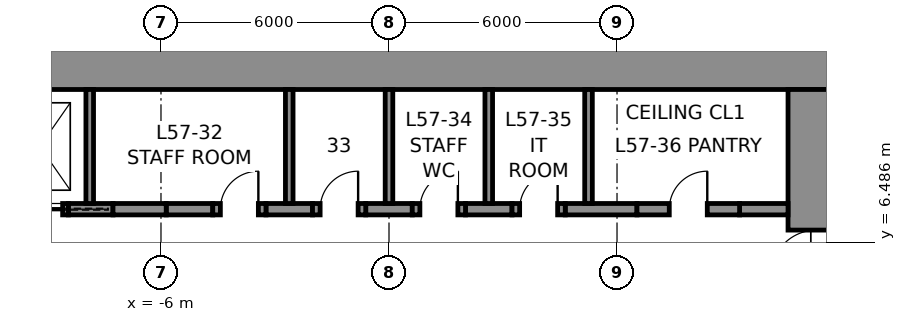
"""IFC4 building model, lengths in metres.
Left out: names, types, materials, properties, quantities, classifications, styles, units other than length and angle.
Written with IfcOpenShell. Run it as: python <this file> out.ifc"""

import sys

from ifc_helpers import new_model, si_unit, direction, frame, frame_2d, origin, place, context, subcontext, project, spatial, rectangle, extrude, element, fill, save


model = new_model("IFC4")
c1 = context("Model", 3, precision=1e-05, world=origin(), true_north=direction((0.0, 1.0)))
c2 = subcontext(c1, "Body", "Model", "MODEL_VIEW")
j1 = project(units=[si_unit("LENGTHUNIT", "METRE"), si_unit("PLANEANGLEUNIT", "RADIAN")], contexts=[c1])
p1 = place(None, origin())
s1 = spatial("IfcSite", under=j1, at=p1, CompositionType="ELEMENT")
p2 = place(p1, origin())
s2 = spatial("IfcBuilding", under=s1, at=p2, CompositionType="ELEMENT")
p3 = place(p2, frame((0.0, 0.0, 257.8)))
s3 = spatial("IfcBuildingStorey", under=s2, at=p3, CompositionType="ELEMENT", Elevation=257.8)
p4 = place(p3, frame((-12.0, 11.25, 0.0), z_axis=(0.0, 0.0, 1.0), x_axis=(1.0, 0.0, 0.0)))
e1 = element("IfcWall", 1, at=p4, inside=s3, PredefinedType="SHEAR", context=c2, shape_type="SweptSolid", body=[
    extrude(rectangle(XDim=24.0, YDim=1.5, at=frame_2d((12.0, 0.0))), origin(), (0.0, 0.0, 1.0), 4.0),
])
p5 = place(p3, frame((11.25, 10.5, 0.0), z_axis=(0.0, 0.0, 1.0), x_axis=(0.0, -1.0, 0.0)))
e2 = element("IfcWall", 2, at=p5, inside=s3, PredefinedType="SHEAR", context=c2, shape_type="SweptSolid", body=[
    extrude(rectangle(XDim=21.0, YDim=1.5, at=frame_2d((10.5, 0.0))), origin(), (0.0, 0.0, 1.0), 4.0),
])
p6 = place(p5, frame((3.7, 0.0, 0.0)))
e3 = element("IfcOpeningElement", 3, at=p6, cuts=e2, PredefinedType="OPENING", context=c2, shape_type="SweptSolid", body=[
    extrude(rectangle(XDim=1.2, YDim=2.3, at=frame_2d((0.6, 1.15))), frame((0.0, 0.76, 0.0), z_axis=(0.0, -1.0, 0.0), x_axis=(1.0, 0.0, 0.0)), (0.0, 0.0, 1.0), 1.52),
])
p7 = place(p5, frame((16.1, 0.0, 0.0)))
e4 = element("IfcOpeningElement", 4, at=p7, cuts=e2, PredefinedType="OPENING", context=c2, shape_type="SweptSolid", body=[
    extrude(rectangle(XDim=1.2, YDim=2.3, at=frame_2d((0.6, 1.15))), frame((0.0, 0.76, 0.0), z_axis=(0.0, -1.0, 0.0), x_axis=(1.0, 0.0, 0.0)), (0.0, 0.0, 1.0), 1.52),
])
p8 = place(p3, frame((-8.438, 7.35, 0.0), z_axis=(0.0, 0.0, 1.0), x_axis=(1.0, 0.0, 0.0)))
e5 = element("IfcWall", 5, at=p8, inside=s3, PredefinedType="SHEAR", context=c2, shape_type="SweptSolid", body=[
    extrude(rectangle(XDim=1.175, YDim=0.3, at=frame_2d((0.587, 0.0))), origin(), (0.0, 0.0, 1.0), 4.0),
])
for number, where, z_axis, x_axis in (
    (6, (-5.863, 7.35, 0.0), (0.0, 0.0, 1.0), (1.0, 0.0, 0.0)),
    (7, (-3.238, 7.35, 0.0), (0.0, 0.0, 1.0), (1.0, 0.0, 0.0)),
    (8, (-0.613, 7.35, 0.0), (0.0, 0.0, 1.0), (1.0, 0.0, 0.0)),
    (9, (2.012, 7.35, 0.0), (0.0, 0.0, 1.0), (1.0, 0.0, 0.0)),
):
    element("IfcWall", number, at=place(p3, frame(where, z_axis=z_axis, x_axis=x_axis)), inside=s3, PredefinedType="SHEAR", context=c2, shape_type="SweptSolid", body=[
        extrude(rectangle(XDim=1.225, YDim=0.3, at=frame_2d((0.613, 0.0))), origin(), (0.0, 0.0, 1.0), 4.0),
    ])
p9 = place(p3, frame((4.637, 7.35, 0.0), z_axis=(0.0, 0.0, 1.0), x_axis=(1.0, 0.0, 0.0)))
e10 = element("IfcWall", 10, at=p9, inside=s3, PredefinedType="SHEAR", context=c2, shape_type="SweptSolid", body=[
    extrude(rectangle(XDim=1.887, YDim=0.3, at=frame_2d((0.944, 0.0))), origin(), (0.0, 0.0, 1.0), 4.0),
])
p10 = place(p3, frame((9.225, 7.35, 0.0), z_axis=(0.0, 0.0, 1.0), x_axis=(1.0, 0.0, 0.0)))
e11 = element("IfcWall", 11, at=p10, inside=s3, PredefinedType="SHEAR", context=c2, shape_type="SweptSolid", body=[
    extrude(rectangle(XDim=1.275, YDim=0.3, at=frame_2d((0.637, 0.0))), origin(), (0.0, 0.0, 1.0), 4.0),
])
p11 = place(p3, frame((-9.938, 7.35, 0.0), z_axis=(0.0, 0.0, 1.0), x_axis=(1.0, 0.0, 0.0)))
e12 = element("IfcWall", 12, at=p11, inside=s3, PredefinedType="PARTITIONING", context=c2, shape_type="SweptSolid", body=[
    extrude(rectangle(XDim=1.5, YDim=0.3, at=frame_2d((0.75, 0.0))), origin(), (0.0, 0.0, 1.0), 4.0),
])
p12 = place(p11, frame((0.15, 0.0, 0.0)))
e13 = element("IfcOpeningElement", 13, at=p12, cuts=e12, PredefinedType="OPENING", context=c2, shape_type="SweptSolid", body=[
    extrude(rectangle(XDim=1.2, YDim=2.3, at=frame_2d((0.6, 1.15))), frame((0.0, 0.16, 0.0), z_axis=(0.0, -1.0, 0.0), x_axis=(1.0, 0.0, 0.0)), (0.0, 0.0, 1.0), 0.32),
])
p13 = place(p3, frame((-7.262, 7.35, 0.0), z_axis=(0.0, 0.0, 1.0), x_axis=(1.0, 0.0, 0.0)))
e14 = element("IfcWall", 14, at=p13, inside=s3, PredefinedType="PARTITIONING", context=c2, shape_type="SweptSolid", body=[
    extrude(rectangle(XDim=1.4, YDim=0.3, at=frame_2d((0.7, 0.0))), origin(), (0.0, 0.0, 1.0), 4.0),
])
p14 = place(p3, frame((-4.637, 7.35, 0.0), z_axis=(0.0, 0.0, 1.0), x_axis=(1.0, 0.0, 0.0)))
e15 = element("IfcWall", 15, at=p14, inside=s3, PredefinedType="PARTITIONING", context=c2, shape_type="SweptSolid", body=[
    extrude(rectangle(XDim=1.4, YDim=0.3, at=frame_2d((0.7, 0.0))), origin(), (0.0, 0.0, 1.0), 4.0),
])
p15 = place(p14, frame((0.2, 0.0, 0.0)))
e16 = element("IfcOpeningElement", 16, at=p15, cuts=e15, PredefinedType="OPENING", context=c2, shape_type="SweptSolid", body=[
    extrude(rectangle(XDim=1.0, YDim=2.3, at=frame_2d((0.5, 1.15))), frame((0.0, 0.16, 0.0), z_axis=(0.0, -1.0, 0.0), x_axis=(1.0, 0.0, 0.0)), (0.0, 0.0, 1.0), 0.32),
])
p16 = place(p3, frame((-2.012, 7.35, 0.0), z_axis=(0.0, 0.0, 1.0), x_axis=(1.0, 0.0, 0.0)))
e17 = element("IfcWall", 17, at=p16, inside=s3, PredefinedType="PARTITIONING", context=c2, shape_type="SweptSolid", body=[
    extrude(rectangle(XDim=1.4, YDim=0.3, at=frame_2d((0.7, 0.0))), origin(), (0.0, 0.0, 1.0), 4.0),
])
p17 = place(p16, frame((0.2, 0.0, 0.0)))
e18 = element("IfcOpeningElement", 18, at=p17, cuts=e17, PredefinedType="OPENING", context=c2, shape_type="SweptSolid", body=[
    extrude(rectangle(XDim=1.0, YDim=2.3, at=frame_2d((0.5, 1.15))), frame((0.0, 0.16, 0.0), z_axis=(0.0, -1.0, 0.0), x_axis=(1.0, 0.0, 0.0)), (0.0, 0.0, 1.0), 0.32),
])
p18 = place(p3, frame((0.613, 7.35, 0.0), z_axis=(0.0, 0.0, 1.0), x_axis=(1.0, 0.0, 0.0)))
e19 = element("IfcWall", 19, at=p18, inside=s3, PredefinedType="PARTITIONING", context=c2, shape_type="SweptSolid", body=[
    extrude(rectangle(XDim=1.4, YDim=0.3, at=frame_2d((0.7, 0.0))), origin(), (0.0, 0.0, 1.0), 4.0),
])
p19 = place(p18, frame((0.2, 0.0, 0.0)))
e20 = element("IfcOpeningElement", 20, at=p19, cuts=e19, PredefinedType="OPENING", context=c2, shape_type="SweptSolid", body=[
    extrude(rectangle(XDim=1.0, YDim=2.3, at=frame_2d((0.5, 1.15))), frame((0.0, 0.16, 0.0), z_axis=(0.0, -1.0, 0.0), x_axis=(1.0, 0.0, 0.0)), (0.0, 0.0, 1.0), 0.32),
])
p20 = place(p3, frame((3.238, 7.35, 0.0), z_axis=(0.0, 0.0, 1.0), x_axis=(1.0, 0.0, 0.0)))
e21 = element("IfcWall", 21, at=p20, inside=s3, PredefinedType="PARTITIONING", context=c2, shape_type="SweptSolid", body=[
    extrude(rectangle(XDim=1.4, YDim=0.3, at=frame_2d((0.7, 0.0))), origin(), (0.0, 0.0, 1.0), 4.0),
])
p21 = place(p20, frame((0.2, 0.0, 0.0)))
e22 = element("IfcOpeningElement", 22, at=p21, cuts=e21, PredefinedType="OPENING", context=c2, shape_type="SweptSolid", body=[
    extrude(rectangle(XDim=1.0, YDim=2.3, at=frame_2d((0.5, 1.15))), frame((0.0, 0.16, 0.0), z_axis=(0.0, -1.0, 0.0), x_axis=(1.0, 0.0, 0.0)), (0.0, 0.0, 1.0), 0.32),
])
p22 = place(p3, frame((6.525, 7.35, 0.0), z_axis=(0.0, 0.0, 1.0), x_axis=(1.0, 0.0, 0.0)))
e23 = element("IfcWall", 23, at=p22, inside=s3, PredefinedType="PARTITIONING", context=c2, shape_type="SweptSolid", body=[
    extrude(rectangle(XDim=2.7, YDim=0.3, at=frame_2d((1.35, 0.0))), origin(), (0.0, 0.0, 1.0), 4.0),
])
p23 = place(p22, frame((0.85, 0.0, 0.0)))
e24 = element("IfcOpeningElement", 24, at=p23, cuts=e23, PredefinedType="OPENING", context=c2, shape_type="SweptSolid", body=[
    extrude(rectangle(XDim=1.0, YDim=2.3, at=frame_2d((0.5, 1.15))), frame((0.0, 0.16, 0.0), z_axis=(0.0, -1.0, 0.0), x_axis=(1.0, 0.0, 0.0)), (0.0, 0.0, 1.0), 0.32),
])
for number, where, z_axis, x_axis in (
    (25, (-7.875, 7.5, 0.0), (0.0, 0.0, 1.0), (0.0, 1.0, 0.0)),
    (26, (-2.625, 7.5, 0.0), (0.0, 0.0, 1.0), (0.0, 1.0, 0.0)),
    (27, (0.0, 7.5, 0.0), (0.0, 0.0, 1.0), (0.0, 1.0, 0.0)),
    (28, (2.625, 7.5, 0.0), (0.0, 0.0, 1.0), (0.0, 1.0, 0.0)),
    (29, (5.25, 7.5, 0.0), (0.0, 0.0, 1.0), (0.0, 1.0, 0.0)),
):
    element("IfcWall", number, at=place(p3, frame(where, z_axis=z_axis, x_axis=x_axis)), inside=s3, PredefinedType="PARTITIONING", context=c2, shape_type="SweptSolid", body=[
        extrude(rectangle(XDim=3.0, YDim=0.2, at=frame_2d((1.5, 0.0))), origin(), (0.0, 0.0, 1.0), 4.0),
    ])
p24 = place(p15, origin())
e30 = element("IfcDoor", 30, at=p24, inside=s3, OperationType="SINGLE_SWING_RIGHT", PredefinedType="DOOR", context=c2, shape_type="SweptSolid", body=[
    extrude(rectangle(XDim=1.0, YDim=2.3, at=frame_2d((0.5, 1.15))), frame((0.0, 0.025, 0.0), z_axis=(0.0, -1.0, 0.0), x_axis=(1.0, 0.0, 0.0)), (0.0, 0.0, 1.0), 0.05),
])
fill(e16, e30)
p25 = place(p17, origin())
e31 = element("IfcDoor", 31, at=p25, inside=s3, OperationType="SINGLE_SWING_RIGHT", PredefinedType="DOOR", context=c2, shape_type="SweptSolid", body=[
    extrude(rectangle(XDim=1.0, YDim=2.3, at=frame_2d((0.5, 1.15))), frame((0.0, 0.025, 0.0), z_axis=(0.0, -1.0, 0.0), x_axis=(1.0, 0.0, 0.0)), (0.0, 0.0, 1.0), 0.05),
])
fill(e18, e31)
p26 = place(p19, origin())
e32 = element("IfcDoor", 32, at=p26, inside=s3, OperationType="SINGLE_SWING_RIGHT", PredefinedType="DOOR", context=c2, shape_type="SweptSolid", body=[
    extrude(rectangle(XDim=1.0, YDim=2.3, at=frame_2d((0.5, 1.15))), frame((0.0, 0.025, 0.0), z_axis=(0.0, -1.0, 0.0), x_axis=(1.0, 0.0, 0.0)), (0.0, 0.0, 1.0), 0.05),
])
fill(e20, e32)
p27 = place(p21, origin())
e33 = element("IfcDoor", 33, at=p27, inside=s3, OperationType="SINGLE_SWING_RIGHT", PredefinedType="DOOR", context=c2, shape_type="SweptSolid", body=[
    extrude(rectangle(XDim=1.0, YDim=2.3, at=frame_2d((0.5, 1.15))), frame((0.0, 0.025, 0.0), z_axis=(0.0, -1.0, 0.0), x_axis=(1.0, 0.0, 0.0)), (0.0, 0.0, 1.0), 0.05),
])
fill(e22, e33)
p28 = place(p23, origin())
e34 = element("IfcDoor", 34, at=p28, inside=s3, OperationType="SINGLE_SWING_RIGHT", PredefinedType="DOOR", context=c2, shape_type="SweptSolid", body=[
    extrude(rectangle(XDim=1.0, YDim=2.3, at=frame_2d((0.5, 1.15))), frame((0.0, 0.025, 0.0), z_axis=(0.0, -1.0, 0.0), x_axis=(1.0, 0.0, 0.0)), (0.0, 0.0, 1.0), 0.05),
])
fill(e24, e34)
p29 = place(p6, frame((1.2, 0.0, 0.0), z_axis=(0.0, 0.0, 1.0), x_axis=(-1.0, 0.0, 0.0)))
e35 = element("IfcDoor", 35, at=p29, inside=s3, OperationType="SINGLE_SWING_LEFT", PredefinedType="DOOR", context=c2, shape_type="SweptSolid", body=[
    extrude(rectangle(XDim=1.2, YDim=2.3, at=frame_2d((0.6, 1.15))), frame((0.0, 0.025, 0.0), z_axis=(0.0, -1.0, 0.0), x_axis=(1.0, 0.0, 0.0)), (0.0, 0.0, 1.0), 0.05),
])
fill(e3, e35)
p30 = place(p12, frame((1.2, 0.0, 0.0), z_axis=(0.0, 0.0, 1.0), x_axis=(-1.0, 0.0, 0.0)))
e36 = element("IfcDoor", 36, at=p30, inside=s3, OperationType="SLIDING_TO_LEFT", PredefinedType="DOOR", context=c2, shape_type="SweptSolid", body=[
    extrude(rectangle(XDim=1.2, YDim=2.3, at=frame_2d((0.6, 1.15))), frame((0.0, 0.025, 0.0), z_axis=(0.0, -1.0, 0.0), x_axis=(1.0, 0.0, 0.0)), (0.0, 0.0, 1.0), 0.05),
])
fill(e13, e36)
save(model, sys.argv[1])
